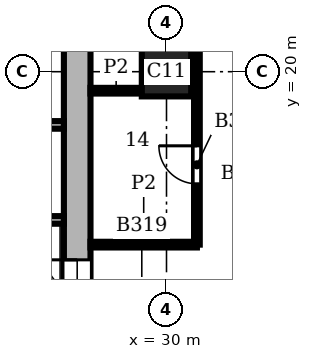
"""IFC4 building model, lengths in metres.
Left out: names, types, materials, properties, quantities, classifications, styles, units other than length and angle.
Written with IfcOpenShell. Run it as: python <this file> out.ifc"""

import sys

from ifc_helpers import new_model, si_unit, direction, frame, frame_2d, origin, origin_2d, place, context, subcontext, project, spatial, rectangle, extrude, element, fill, save


model = new_model("IFC4")
c1 = context("Model", 3, precision=1e-05, world=origin(), true_north=direction((0.0, 1.0)))
c2 = subcontext(c1, "Body", "Model", "MODEL_VIEW")
j1 = project(units=[si_unit("LENGTHUNIT", "METRE"), si_unit("PLANEANGLEUNIT", "RADIAN")], contexts=[c1])
p1 = place(None, origin())
s1 = spatial("IfcSite", under=j1, at=p1, CompositionType="ELEMENT")
p2 = place(p1, origin())
s2 = spatial("IfcBuilding", under=s1, at=p2, CompositionType="ELEMENT")
p3 = place(p2, frame((0.0, 0.0, 155.1)))
s3 = spatial("IfcBuildingStorey", under=s2, at=p3, CompositionType="ELEMENT", Elevation=155.1)
p4 = place(p3, frame((30.0, 20.0, 0.0), z_axis=(0.0, 0.0, 1.0), x_axis=(1.0, 0.0, 0.0)))
e1 = element("IfcColumn", 1, at=p4, inside=s3, PredefinedType="COLUMN", context=c2, shape_type="SweptSolid", body=[
    extrude(rectangle(XDim=1.3, YDim=1.3, at=origin_2d()), origin(), (0.0, 0.0, 1.0), 3.9),
])
p5 = place(p3, frame((27.65, 8.7, 0.0), z_axis=(0.0, 0.0, 1.0), x_axis=(0.0, 1.0, 0.0)))
e2 = element("IfcWall", 2, at=p5, inside=s3, PredefinedType="SHEAR", context=c2, shape_type="SweptSolid", body=[
    extrude(rectangle(XDim=18.6, YDim=0.7, at=frame_2d((9.3, 0.0))), origin(), (0.0, 0.0, 1.0), 3.9),
])
p6 = place(p5, frame((4.75, 0.0, 0.0)))
e3 = element("IfcOpeningElement", 3, at=p6, cuts=e2, PredefinedType="OPENING", context=c2, shape_type="SweptSolid", body=[
    extrude(rectangle(XDim=1.6, YDim=2.1, at=frame_2d((0.8, 1.05))), frame((0.0, 0.36, 0.0), z_axis=(0.0, -1.0, 0.0), x_axis=(1.0, 0.0, 0.0)), (0.0, 0.0, 1.0), 0.72),
])
for number, where, z_axis, x_axis in (
    (4, (24.3, 16.1, 0.0), (0.0, 0.0, 1.0), (1.0, 0.0, 0.0)),
    (5, (24.3, 18.6, 0.0), (0.0, 0.0, 1.0), (1.0, 0.0, 0.0)),
):
    element("IfcWall", number, at=place(p3, frame(where, z_axis=z_axis, x_axis=x_axis)), inside=s3, PredefinedType="SHEAR", context=c2, shape_type="SweptSolid", body=[
        extrude(rectangle(XDim=3.0, YDim=0.2, at=frame_2d((1.5, 0.0))), origin(), (0.0, 0.0, 1.0), 3.58),
    ])
p7 = place(p3, frame((30.8, 15.45, 0.0), z_axis=(0.0, 0.0, 1.0), x_axis=(0.0, 1.0, 0.0)))
e6 = element("IfcWall", 6, at=p7, inside=s3, PredefinedType="PARTITIONING", context=c2, shape_type="SweptSolid", body=[
    extrude(rectangle(XDim=10.55, YDim=0.15, at=frame_2d((5.275, 0.0))), origin(), (0.0, 0.0, 1.0), 3.58),
])
p8 = place(p7, frame((7.15, 0.0, 0.0)))
e7 = element("IfcOpeningElement", 7, at=p8, cuts=e6, PredefinedType="OPENING", context=c2, shape_type="SweptSolid", body=[
    extrude(rectangle(XDim=1.0, YDim=2.1, at=frame_2d((0.5, 1.05))), frame((0.0, 0.085, 0.0), z_axis=(0.0, -1.0, 0.0), x_axis=(1.0, 0.0, 0.0)), (0.0, 0.0, 1.0), 0.17),
])
p9 = place(p7, frame((1.6, 0.0, 0.0)))
e8 = element("IfcOpeningElement", 8, at=p9, cuts=e6, PredefinedType="OPENING", context=c2, shape_type="SweptSolid", body=[
    extrude(rectangle(XDim=1.0, YDim=2.1, at=frame_2d((0.5, 1.05))), frame((0.0, 0.085, 0.0), z_axis=(0.0, -1.0, 0.0), x_axis=(1.0, 0.0, 0.0)), (0.0, 0.0, 1.0), 0.17),
])
p10 = place(p3, frame((28.0, 15.45, 0.0), z_axis=(0.0, 0.0, 1.0), x_axis=(1.0, 0.0, 0.0)))
e9 = element("IfcWall", 9, at=p10, inside=s3, PredefinedType="PARTITIONING", context=c2, shape_type="SweptSolid", body=[
    extrude(rectangle(XDim=2.8, YDim=0.15, at=frame_2d((1.4, 0.0))), origin(), (0.0, 0.0, 1.0), 3.58),
])
p11 = place(p3, frame((28.0, 19.5, 0.0), z_axis=(0.0, 0.0, 1.0), x_axis=(1.0, 0.0, 0.0)))
e10 = element("IfcWall", 10, at=p11, inside=s3, PredefinedType="PARTITIONING", context=c2, shape_type="SweptSolid", body=[
    extrude(rectangle(XDim=1.35, YDim=0.15, at=frame_2d((0.675, 0.0))), origin(), (0.0, 0.0, 1.0), 3.58),
])
p12 = place(p6, origin())
e11 = element("IfcDoor", 11, at=p12, inside=s3, OperationType="DOUBLE_DOOR_SINGLE_SWING", PredefinedType="DOOR", context=c2, shape_type="SweptSolid", body=[
    extrude(rectangle(XDim=1.6, YDim=2.1, at=frame_2d((0.8, 1.05))), frame((0.0, 0.025, 0.0), z_axis=(0.0, -1.0, 0.0), x_axis=(1.0, 0.0, 0.0)), (0.0, 0.0, 1.0), 0.05),
])
fill(e3, e11)
p13 = place(p9, origin())
e12 = element("IfcDoor", 12, at=p13, inside=s3, OperationType="SINGLE_SWING_RIGHT", PredefinedType="DOOR", context=c2, shape_type="SweptSolid", body=[
    extrude(rectangle(XDim=1.0, YDim=2.1, at=frame_2d((0.5, 1.05))), frame((0.0, 0.025, 0.0), z_axis=(0.0, -1.0, 0.0), x_axis=(1.0, 0.0, 0.0)), (0.0, 0.0, 1.0), 0.05),
])
fill(e8, e12)
save(model, sys.argv[1])
